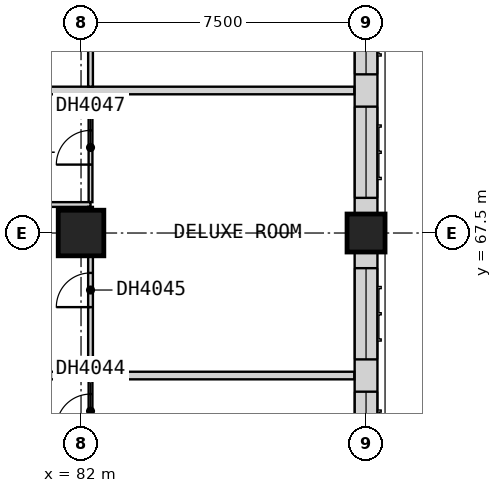
"""IFC4 building model, lengths in metres.
Left out: names, types, materials, properties, quantities, classifications, styles, units other than length and angle.
Written with IfcOpenShell. Run it as: python <this file> out.ifc"""

import sys

from ifc_helpers import new_model, si_unit, direction, frame, frame_2d, origin, origin_2d, place, context, subcontext, project, spatial, rectangle, extrude, element, fill, save


model = new_model("IFC4")
c1 = context("Model", 3, precision=1e-05, world=origin(), true_north=direction((0.0, 1.0)))
c2 = subcontext(c1, "Body", "Model", "MODEL_VIEW")
j1 = project(units=[si_unit("LENGTHUNIT", "METRE"), si_unit("PLANEANGLEUNIT", "RADIAN")], contexts=[c1])
p1 = place(None, origin())
s1 = spatial("IfcSite", under=j1, at=p1, CompositionType="ELEMENT")
p2 = place(p1, origin())
s2 = spatial("IfcBuilding", under=s1, at=p2, CompositionType="ELEMENT")
p3 = place(p2, frame((0.0, 0.0, 44.8)))
s3 = spatial("IfcBuildingStorey", under=s2, at=p3, CompositionType="ELEMENT", Elevation=44.8)
p4 = place(p3, frame((82.0, 67.5, 0.0), z_axis=(0.0, 0.0, 1.0), x_axis=(1.0, 0.0, 0.0)))
e1 = element("IfcColumn", 1, at=p4, inside=s3, PredefinedType="COLUMN", context=c2, shape_type="SweptSolid", body=[
    extrude(rectangle(XDim=1.2, YDim=1.2, at=origin_2d()), origin(), (0.0, 0.0, 1.0), 3.6),
])
p5 = place(p3, frame((89.5, 67.5, 0.0), z_axis=(0.0, 0.0, 1.0), x_axis=(1.0, 0.0, 0.0)))
e2 = element("IfcColumn", 2, at=p5, inside=s3, PredefinedType="COLUMN", context=c2, shape_type="SweptSolid", body=[
    extrude(rectangle(XDim=1.0, YDim=1.0, at=origin_2d()), origin(), (0.0, 0.0, 1.0), 3.6),
])
p6 = place(p3, frame((89.5, 60.5, 0.0), z_axis=(0.0, 0.0, 1.0), x_axis=(0.0, 1.0, 0.0)))
e3 = element("IfcWall", 3, at=p6, inside=s3, PredefinedType="SOLIDWALL", context=c2, shape_type="SweptSolid", body=[
    extrude(rectangle(XDim=6.5, YDim=0.6, at=frame_2d((3.25, 0.0))), origin(), (0.0, 0.0, 1.0), 2.85),
])
p7 = place(p6, frame((0.425, 0.0, 0.8)))
e4 = element("IfcOpeningElement", 4, at=p7, cuts=e3, PredefinedType="OPENING", context=c2, shape_type="SweptSolid", body=[
    extrude(rectangle(XDim=2.4, YDim=1.8, at=frame_2d((1.2, 0.9))), frame((0.0, 0.31, 0.0), z_axis=(0.0, -1.0, 0.0), x_axis=(1.0, 0.0, 0.0)), (0.0, 0.0, 1.0), 0.62),
])
p8 = place(p6, frame((3.675, 0.0, 0.8)))
e5 = element("IfcOpeningElement", 5, at=p8, cuts=e3, PredefinedType="OPENING", context=c2, shape_type="SweptSolid", body=[
    extrude(rectangle(XDim=2.4, YDim=1.8, at=frame_2d((1.2, 0.9))), frame((0.0, 0.31, 0.0), z_axis=(0.0, -1.0, 0.0), x_axis=(1.0, 0.0, 0.0)), (0.0, 0.0, 1.0), 0.62),
])
p9 = place(p3, frame((89.5, 68.0, 0.0), z_axis=(0.0, 0.0, 1.0), x_axis=(0.0, 1.0, 0.0)))
e6 = element("IfcWall", 6, at=p9, inside=s3, PredefinedType="SOLIDWALL", context=c2, shape_type="SweptSolid", body=[
    extrude(rectangle(XDim=6.5, YDim=0.6, at=frame_2d((3.25, 0.0))), origin(), (0.0, 0.0, 1.0), 2.85),
])
p10 = place(p9, frame((0.425, 0.0, 0.8)))
e7 = element("IfcOpeningElement", 7, at=p10, cuts=e6, PredefinedType="OPENING", context=c2, shape_type="SweptSolid", body=[
    extrude(rectangle(XDim=2.4, YDim=1.8, at=frame_2d((1.2, 0.9))), frame((0.0, 0.31, 0.0), z_axis=(0.0, -1.0, 0.0), x_axis=(1.0, 0.0, 0.0)), (0.0, 0.0, 1.0), 0.62),
])
p11 = place(p9, frame((3.675, 0.0, 0.8)))
e8 = element("IfcOpeningElement", 8, at=p11, cuts=e6, PredefinedType="OPENING", context=c2, shape_type="SweptSolid", body=[
    extrude(rectangle(XDim=2.4, YDim=1.8, at=frame_2d((1.2, 0.9))), frame((0.0, 0.31, 0.0), z_axis=(0.0, -1.0, 0.0), x_axis=(1.0, 0.0, 0.0)), (0.0, 0.0, 1.0), 0.62),
])
for number, where, z_axis, x_axis in (
    (9, (77.475, 63.75, 0.0), (0.0, 0.0, 1.0), (1.0, 0.0, 0.0)),
    (10, (77.475, 71.25, 0.0), (0.0, 0.0, 1.0), (1.0, 0.0, 0.0)),
):
    element("IfcWall", number, at=place(p3, frame(where, z_axis=z_axis, x_axis=x_axis)), inside=s3, PredefinedType="PARTITIONING", context=c2, shape_type="SweptSolid", body=[
        extrude(rectangle(XDim=11.715, YDim=0.2, at=frame_2d((5.857, 0.0))), origin(), (0.0, 0.0, 1.0), 3.35),
    ])
p12 = place(p3, frame((82.25, 61.938, 0.0), z_axis=(0.0, 0.0, 1.0), x_axis=(0.0, 1.0, 0.0)))
e11 = element("IfcWall", 11, at=p12, inside=s3, PredefinedType="PARTITIONING", context=c2, shape_type="SweptSolid", body=[
    extrude(rectangle(XDim=1.712, YDim=0.1, at=frame_2d((0.856, 0.0))), origin(), (0.0, 0.0, 1.0), 3.35),
])
p13 = place(p12, frame((0.425, 0.0, 0.0)))
e12 = element("IfcOpeningElement", 12, at=p13, cuts=e11, PredefinedType="OPENING", context=c2, shape_type="SweptSolid", body=[
    extrude(rectangle(XDim=0.9, YDim=2.1, at=frame_2d((0.45, 1.05))), frame((0.0, 0.06, 0.0), z_axis=(0.0, -1.0, 0.0), x_axis=(1.0, 0.0, 0.0)), (0.0, 0.0, 1.0), 0.12),
])
p14 = place(p3, frame((82.25, 68.312, 0.0), z_axis=(0.0, 0.0, 1.0), x_axis=(0.0, 1.0, 0.0)))
e13 = element("IfcWall", 13, at=p14, inside=s3, PredefinedType="PARTITIONING", context=c2, shape_type="SweptSolid", body=[
    extrude(rectangle(XDim=2.837, YDim=0.1, at=frame_2d((1.419, 0.0))), origin(), (0.0, 0.0, 1.0), 3.35),
])
p15 = place(p14, frame((0.988, 0.0, 0.0)))
e14 = element("IfcOpeningElement", 14, at=p15, cuts=e13, PredefinedType="OPENING", context=c2, shape_type="SweptSolid", body=[
    extrude(rectangle(XDim=0.9, YDim=2.1, at=frame_2d((0.45, 1.05))), frame((0.0, 0.06, 0.0), z_axis=(0.0, -1.0, 0.0), x_axis=(1.0, 0.0, 0.0)), (0.0, 0.0, 1.0), 0.12),
])
p16 = place(p3, frame((77.475, 68.25, 0.0), z_axis=(0.0, 0.0, 1.0), x_axis=(1.0, 0.0, 0.0)))
e15 = element("IfcWall", 15, at=p16, inside=s3, PredefinedType="PARTITIONING", context=c2, shape_type="SweptSolid", body=[
    extrude(rectangle(XDim=4.775, YDim=0.125, at=frame_2d((2.387, 0.0))), origin(), (0.0, 0.0, 1.0), 3.35),
])
p17 = place(p3, frame((82.25, 63.85, 0.0), z_axis=(0.0, 0.0, 1.0), x_axis=(0.0, 1.0, 0.0)))
e16 = element("IfcWall", 16, at=p17, inside=s3, PredefinedType="PARTITIONING", context=c2, shape_type="SweptSolid", body=[
    extrude(rectangle(XDim=4.337, YDim=0.125, at=frame_2d((2.169, 0.0))), origin(), (0.0, 0.0, 1.0), 3.35),
])
p18 = place(p17, frame((1.7, 0.0, 0.0)))
e17 = element("IfcOpeningElement", 17, at=p18, cuts=e16, PredefinedType="OPENING", context=c2, shape_type="SweptSolid", body=[
    extrude(rectangle(XDim=0.9, YDim=2.1, at=frame_2d((0.45, 1.05))), frame((0.0, 0.073, 0.0), z_axis=(0.0, -1.0, 0.0), x_axis=(1.0, 0.0, 0.0)), (0.0, 0.0, 1.0), 0.145),
])
p19 = place(p3, frame((82.25, 71.35, 0.0), z_axis=(0.0, 0.0, 1.0), x_axis=(0.0, 1.0, 0.0)))
e18 = element("IfcWall", 18, at=p19, inside=s3, PredefinedType="PARTITIONING", context=c2, shape_type="SweptSolid", body=[
    extrude(rectangle(XDim=4.337, YDim=0.125, at=frame_2d((2.169, 0.0))), origin(), (0.0, 0.0, 1.0), 3.35),
])
p20 = place(p19, frame((1.7, 0.0, 0.0)))
e19 = element("IfcOpeningElement", 19, at=p20, cuts=e18, PredefinedType="OPENING", context=c2, shape_type="SweptSolid", body=[
    extrude(rectangle(XDim=0.9, YDim=2.1, at=frame_2d((0.45, 1.05))), frame((0.0, 0.073, 0.0), z_axis=(0.0, -1.0, 0.0), x_axis=(1.0, 0.0, 0.0)), (0.0, 0.0, 1.0), 0.145),
])
p21 = place(p7, origin())
e20 = element("IfcWindow", 20, at=p21, inside=s3, PartitioningType="SINGLE_PANEL", PredefinedType="WINDOW", context=c2, shape_type="SweptSolid", body=[
    extrude(rectangle(XDim=2.4, YDim=1.8, at=frame_2d((1.2, 0.9))), frame((0.0, -0.07, 0.0), z_axis=(0.0, -1.0, 0.0), x_axis=(1.0, 0.0, 0.0)), (0.0, 0.0, 1.0), 0.06),
])
fill(e4, e20)
p22 = place(p8, origin())
e21 = element("IfcWindow", 21, at=p22, inside=s3, PartitioningType="SINGLE_PANEL", PredefinedType="WINDOW", context=c2, shape_type="SweptSolid", body=[
    extrude(rectangle(XDim=2.4, YDim=1.8, at=frame_2d((1.2, 0.9))), frame((0.0, -0.07, 0.0), z_axis=(0.0, -1.0, 0.0), x_axis=(1.0, 0.0, 0.0)), (0.0, 0.0, 1.0), 0.06),
])
fill(e5, e21)
p23 = place(p10, origin())
e22 = element("IfcWindow", 22, at=p23, inside=s3, PartitioningType="SINGLE_PANEL", PredefinedType="WINDOW", context=c2, shape_type="SweptSolid", body=[
    extrude(rectangle(XDim=2.4, YDim=1.8, at=frame_2d((1.2, 0.9))), frame((0.0, -0.07, 0.0), z_axis=(0.0, -1.0, 0.0), x_axis=(1.0, 0.0, 0.0)), (0.0, 0.0, 1.0), 0.06),
])
fill(e7, e22)
p24 = place(p11, origin())
e23 = element("IfcWindow", 23, at=p24, inside=s3, PartitioningType="SINGLE_PANEL", PredefinedType="WINDOW", context=c2, shape_type="SweptSolid", body=[
    extrude(rectangle(XDim=2.4, YDim=1.8, at=frame_2d((1.2, 0.9))), frame((0.0, -0.07, 0.0), z_axis=(0.0, -1.0, 0.0), x_axis=(1.0, 0.0, 0.0)), (0.0, 0.0, 1.0), 0.06),
])
fill(e8, e23)
p25 = place(p13, origin())
e24 = element("IfcDoor", 24, at=p25, inside=s3, OperationType="SINGLE_SWING_LEFT", PredefinedType="DOOR", context=c2, shape_type="SweptSolid", body=[
    extrude(rectangle(XDim=0.9, YDim=2.1, at=frame_2d((0.45, 1.05))), frame((0.0, 0.025, 0.0), z_axis=(0.0, -1.0, 0.0), x_axis=(1.0, 0.0, 0.0)), (0.0, 0.0, 1.0), 0.05),
])
fill(e12, e24)
p26 = place(p18, origin())
e25 = element("IfcDoor", 25, at=p26, inside=s3, OperationType="SINGLE_SWING_LEFT", PredefinedType="DOOR", context=c2, shape_type="SweptSolid", body=[
    extrude(rectangle(XDim=0.9, YDim=2.1, at=frame_2d((0.45, 1.05))), frame((0.0, 0.025, 0.0), z_axis=(0.0, -1.0, 0.0), x_axis=(1.0, 0.0, 0.0)), (0.0, 0.0, 1.0), 0.05),
])
fill(e17, e25)
p27 = place(p15, origin())
e26 = element("IfcDoor", 26, at=p27, inside=s3, OperationType="SINGLE_SWING_LEFT", PredefinedType="DOOR", context=c2, shape_type="SweptSolid", body=[
    extrude(rectangle(XDim=0.9, YDim=2.1, at=frame_2d((0.45, 1.05))), frame((0.0, 0.025, 0.0), z_axis=(0.0, -1.0, 0.0), x_axis=(1.0, 0.0, 0.0)), (0.0, 0.0, 1.0), 0.05),
])
fill(e14, e26)
save(model, sys.argv[1])
